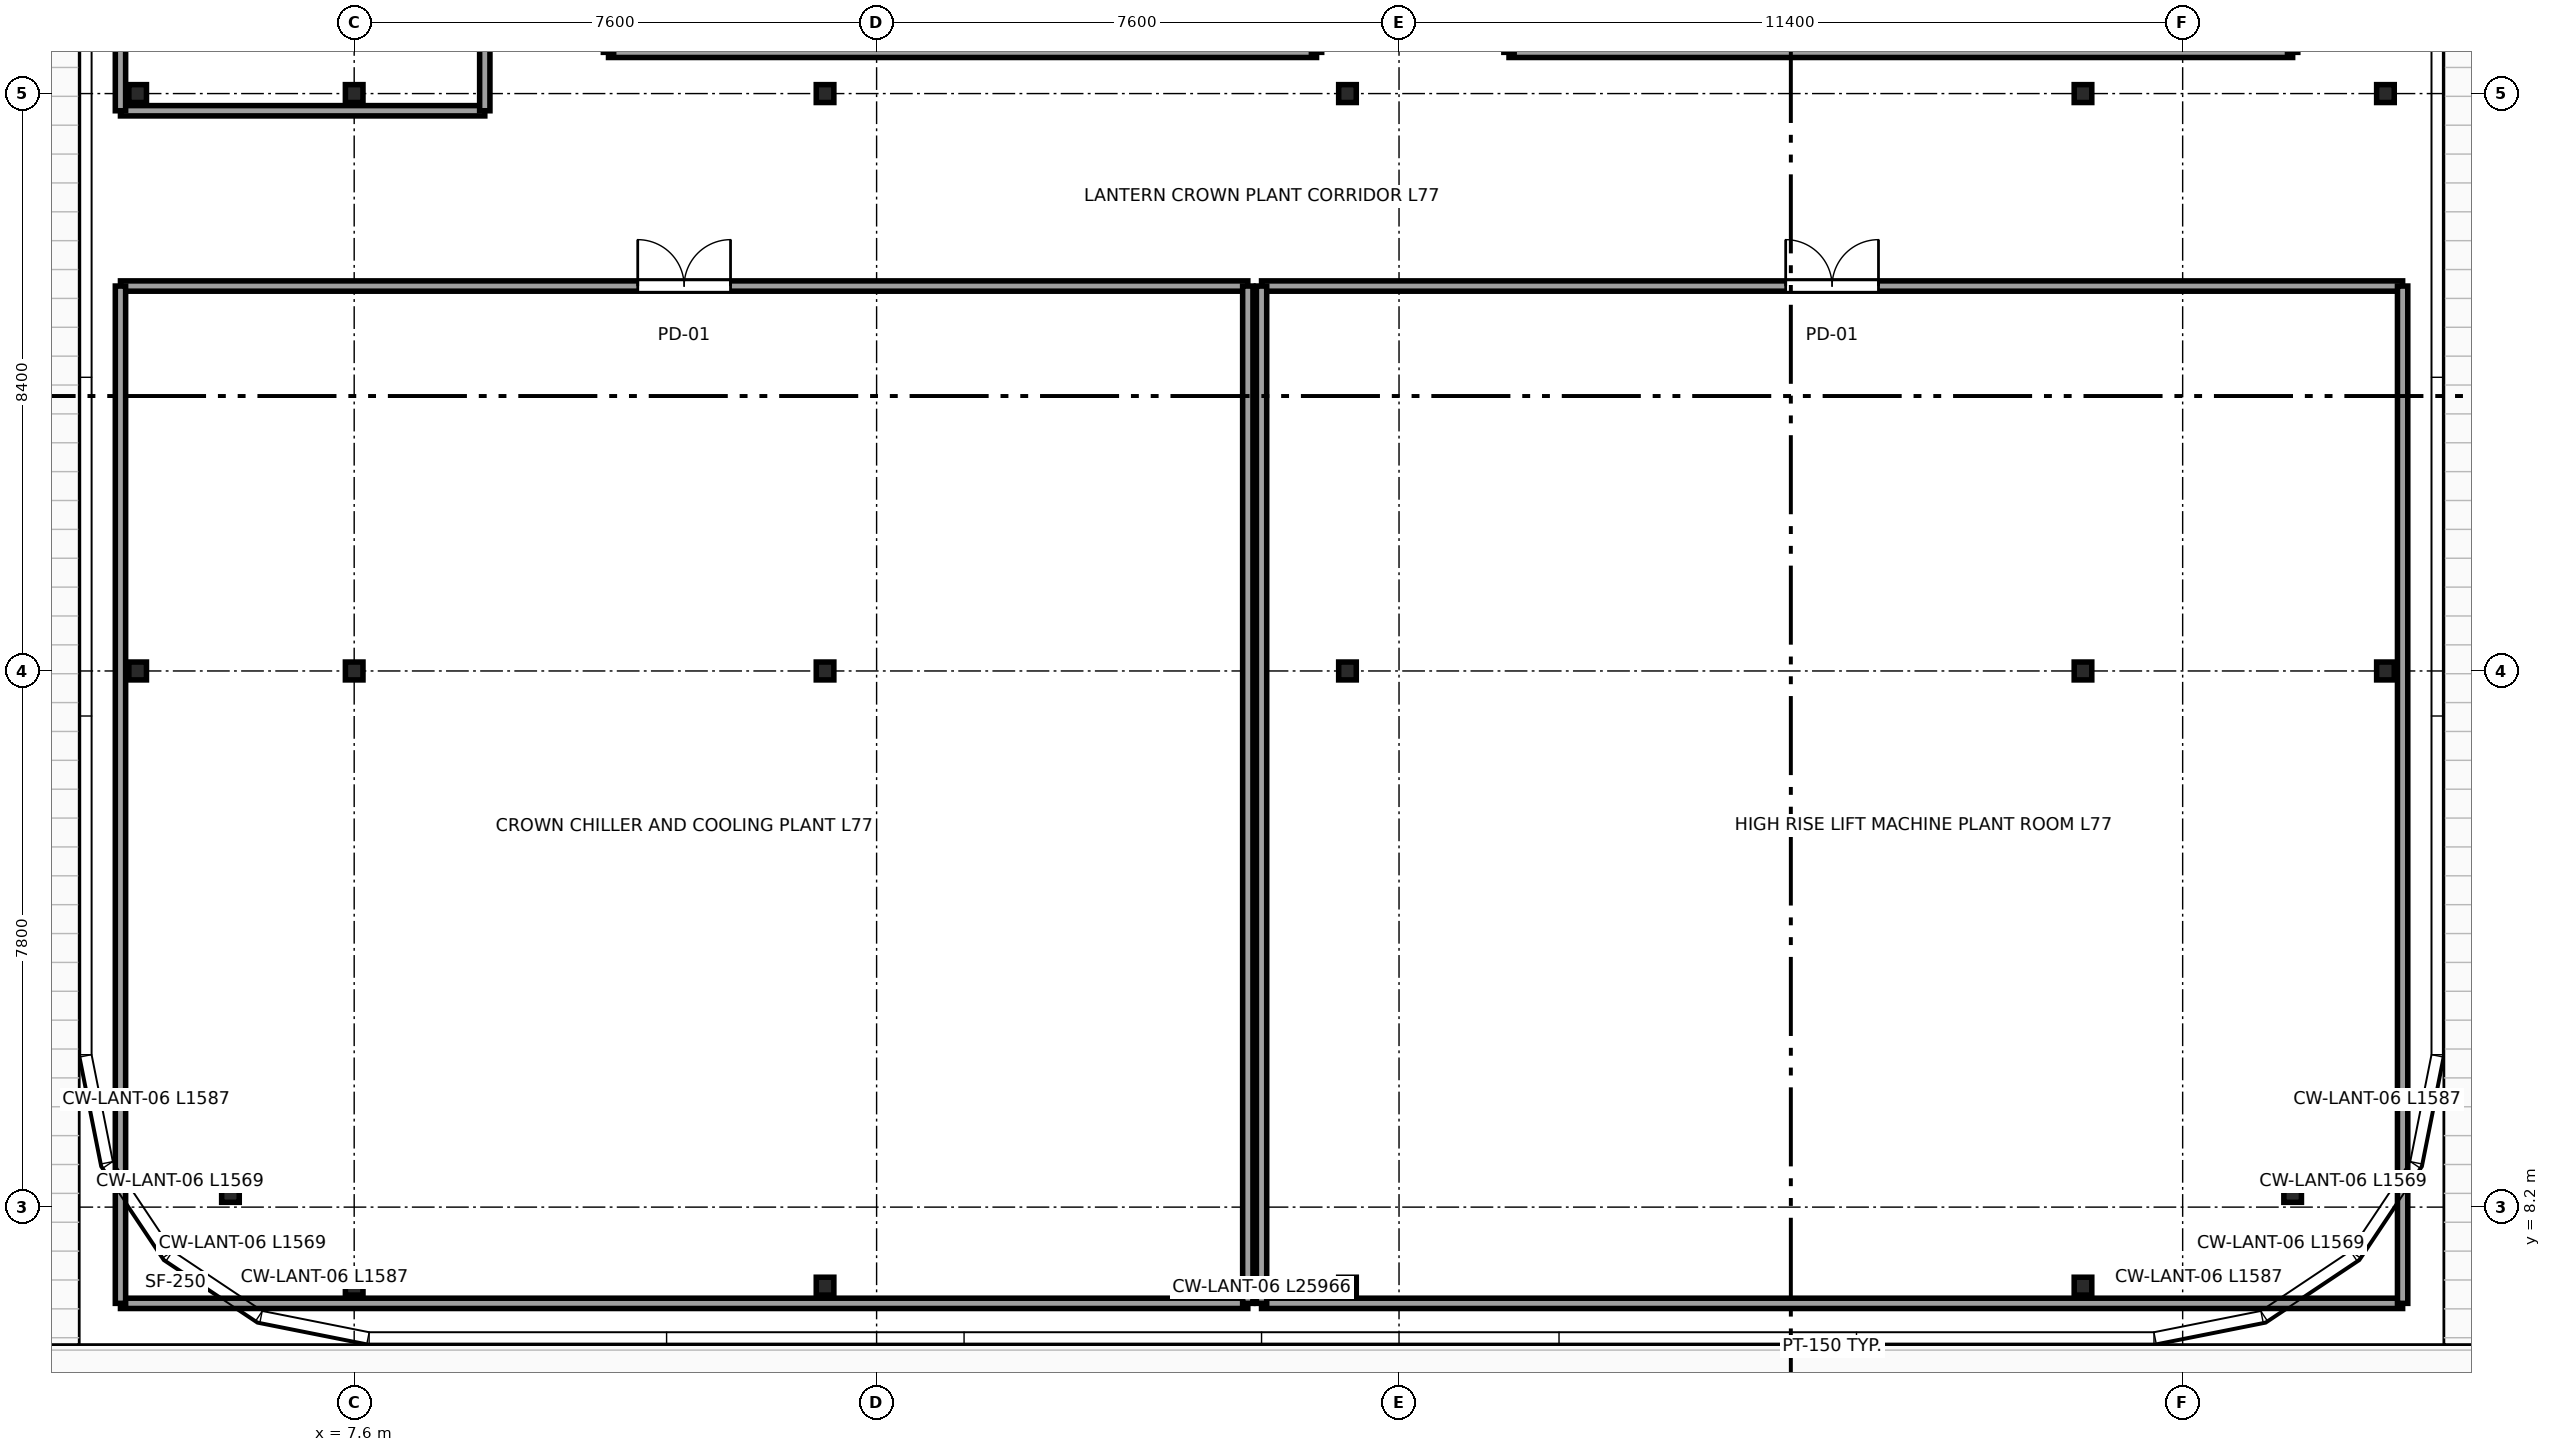
"""IFC4 building model, lengths in metres.
Left out: names, types, materials, properties, quantities, classifications, styles, units other than length and angle.
Written with IfcOpenShell. Run it as: python <this file> out.ifc"""

import sys

from ifc_helpers import new_model, si_unit, direction, frame, frame_2d, origin, origin_2d, place, context, subcontext, project, spatial, rectangle, i_section, extrude, source, transform, mapped, element, fill, save


model = new_model("IFC4")
c1 = context("Model", 3, precision=1e-05, world=origin(), true_north=direction((0.0, 1.0)))
c2 = subcontext(c1, "Body", "Model", "MODEL_VIEW")
j1 = project(units=[si_unit("LENGTHUNIT", "METRE"), si_unit("PLANEANGLEUNIT", "RADIAN")], contexts=[c1])
p1 = place(None, origin())
s1 = spatial("IfcSite", under=j1, at=p1, CompositionType="ELEMENT")
p2 = place(p1, origin())
s2 = spatial("IfcBuilding", under=s1, at=p2, CompositionType="ELEMENT")
p3 = place(p2, frame((0.0, 0.0, 290.95)))
s3 = spatial("IfcBuildingStorey", under=s2, at=p3, CompositionType="ELEMENT", Elevation=290.95)
m1 = source(origin(), c2, "Body", "SweptSolid", [
    extrude(i_section(OverallWidth=0.256, OverallDepth=0.26, WebThickness=0.01, FlangeThickness=0.017, FilletRadius=0.014, at=origin_2d()), origin(), (0.0, 0.0, 1.0), 3.8),
])
for number, where, z_axis, x_axis in (
    (1, (5.8, 8.4, 0.0), (0.0, 0.0, 1.0), (1.0, 0.0, 0.0)),
    (2, (4.45, 16.0, 0.0), (0.0, 0.0, 1.0), (1.0, 0.0, 0.0)),
    (3, (4.45, 24.4, 0.0), (0.0, 0.0, 1.0), (1.0, 0.0, 0.0)),
    (4, (7.6, 7.05, 0.0), (0.0, 0.0, 1.0), (1.0, 0.0, 0.0)),
    (5, (7.6, 16.0, 0.0), (0.0, 0.0, 1.0), (1.0, 0.0, 0.0)),
    (6, (7.6, 24.4, 0.0), (0.0, 0.0, 1.0), (1.0, 0.0, 0.0)),
    (7, (14.45, 7.05, 0.0), (0.0, 0.0, 1.0), (1.0, 0.0, 0.0)),
    (8, (14.45, 16.0, 0.0), (0.0, 0.0, 1.0), (1.0, 0.0, 0.0)),
    (9, (14.45, 24.4, 0.0), (0.0, 0.0, 1.0), (1.0, 0.0, 0.0)),
    (10, (22.05, 7.05, 0.0), (0.0, 0.0, 1.0), (1.0, 0.0, 0.0)),
    (11, (22.05, 16.0, 0.0), (0.0, 0.0, 1.0), (1.0, 0.0, 0.0)),
    (12, (22.05, 24.4, 0.0), (0.0, 0.0, 1.0), (1.0, 0.0, 0.0)),
    (13, (32.75, 7.05, 0.0), (0.0, 0.0, 1.0), (1.0, 0.0, 0.0)),
    (14, (32.75, 16.0, 0.0), (0.0, 0.0, 1.0), (1.0, 0.0, 0.0)),
    (15, (32.75, 24.4, 0.0), (0.0, 0.0, 1.0), (1.0, 0.0, 0.0)),
    (16, (35.8, 8.4, 0.0), (0.0, 0.0, 1.0), (1.0, 0.0, 0.0)),
    (17, (37.15, 16.0, 0.0), (0.0, 0.0, 1.0), (1.0, 0.0, 0.0)),
    (18, (37.15, 24.4, 0.0), (0.0, 0.0, 1.0), (1.0, 0.0, 0.0)),
):
    element("IfcColumn", number, at=place(p3, frame(where, z_axis=z_axis, x_axis=x_axis)), inside=s3, PredefinedType="COLUMN", context=c2, shape_type="MappedRepresentation", body=[
        mapped(m1, transform((0.0, 0.0, 0.0), x_axis=(1.0, 0.0, 0.0), y_axis=(0.0, 1.0, 0.0), z_axis=(0.0, 0.0, 1.0), scale=1.0)),
    ])
p4 = place(p3, frame((4.2, 6.8, 0.0), z_axis=(0.0, 0.0, 1.0), x_axis=(1.0, 0.0, 0.0)))
e19 = element("IfcWall", 19, at=p4, inside=s3, PredefinedType="PARTITIONING", context=c2, shape_type="SweptSolid", body=[
    extrude(rectangle(XDim=16.4, YDim=0.15, at=frame_2d((8.2, 0.0))), origin(), (0.0, 0.0, 1.0), 2.37),
])
p5 = place(p3, frame((4.2, 21.6, 0.0), z_axis=(0.0, 0.0, 1.0), x_axis=(1.0, 0.0, 0.0)))
e20 = element("IfcWall", 20, at=p5, inside=s3, PredefinedType="PARTITIONING", context=c2, shape_type="SweptSolid", body=[
    extrude(rectangle(XDim=16.4, YDim=0.15, at=frame_2d((8.2, 0.0))), origin(), (0.0, 0.0, 1.0), 3.58),
])
p6 = place(p5, frame((7.525, 0.0, 0.0)))
e21 = element("IfcOpeningElement", 21, at=p6, cuts=e20, PredefinedType="OPENING", context=c2, shape_type="SweptSolid", body=[
    extrude(rectangle(XDim=1.35, YDim=2.15, at=frame_2d((0.675, 1.075))), frame((0.0, 0.085, 0.0), z_axis=(0.0, -1.0, 0.0), x_axis=(1.0, 0.0, 0.0)), (0.0, 0.0, 1.0), 0.17),
])
p7 = place(p3, frame((4.2, 6.8, 0.0), z_axis=(0.0, 0.0, 1.0), x_axis=(0.0, 1.0, 0.0)))
e22 = element("IfcWall", 22, at=p7, inside=s3, PredefinedType="PARTITIONING", context=c2, shape_type="SweptSolid", body=[
    extrude(rectangle(XDim=14.8, YDim=0.15, at=frame_2d((7.4, 0.0))), origin(), (0.0, 0.0, 1.0), 2.37),
])
p8 = place(p3, frame((20.6, 6.8, 0.0), z_axis=(0.0, 0.0, 1.0), x_axis=(0.0, 1.0, 0.0)))
e23 = element("IfcWall", 23, at=p8, inside=s3, PredefinedType="PARTITIONING", context=c2, shape_type="SweptSolid", body=[
    extrude(rectangle(XDim=14.8, YDim=0.15, at=frame_2d((7.4, 0.0))), origin(), (0.0, 0.0, 1.0), 3.58),
])
p9 = place(p3, frame((20.8, 6.8, 0.0), z_axis=(0.0, 0.0, 1.0), x_axis=(1.0, 0.0, 0.0)))
e24 = element("IfcWall", 24, at=p9, inside=s3, PredefinedType="PARTITIONING", context=c2, shape_type="SweptSolid", body=[
    extrude(rectangle(XDim=16.6, YDim=0.15, at=frame_2d((8.3, 0.0))), origin(), (0.0, 0.0, 1.0), 2.37),
])
p10 = place(p3, frame((20.8, 21.6, 0.0), z_axis=(0.0, 0.0, 1.0), x_axis=(1.0, 0.0, 0.0)))
e25 = element("IfcWall", 25, at=p10, inside=s3, PredefinedType="PARTITIONING", context=c2, shape_type="SweptSolid", body=[
    extrude(rectangle(XDim=16.6, YDim=0.15, at=frame_2d((8.3, 0.0))), origin(), (0.0, 0.0, 1.0), 3.58),
])
p11 = place(p10, frame((7.625, 0.0, 0.0)))
e26 = element("IfcOpeningElement", 26, at=p11, cuts=e25, PredefinedType="OPENING", context=c2, shape_type="SweptSolid", body=[
    extrude(rectangle(XDim=1.35, YDim=2.15, at=frame_2d((0.675, 1.075))), frame((0.0, 0.085, 0.0), z_axis=(0.0, -1.0, 0.0), x_axis=(1.0, 0.0, 0.0)), (0.0, 0.0, 1.0), 0.17),
])
p12 = place(p3, frame((20.8, 6.8, 0.0), z_axis=(0.0, 0.0, 1.0), x_axis=(0.0, 1.0, 0.0)))
e27 = element("IfcWall", 27, at=p12, inside=s3, PredefinedType="PARTITIONING", context=c2, shape_type="SweptSolid", body=[
    extrude(rectangle(XDim=14.8, YDim=0.15, at=frame_2d((7.4, 0.0))), origin(), (0.0, 0.0, 1.0), 3.58),
])
p13 = place(p3, frame((37.4, 6.8, 0.0), z_axis=(0.0, 0.0, 1.0), x_axis=(0.0, 1.0, 0.0)))
e28 = element("IfcWall", 28, at=p13, inside=s3, PredefinedType="PARTITIONING", context=c2, shape_type="SweptSolid", body=[
    extrude(rectangle(XDim=14.8, YDim=0.15, at=frame_2d((7.4, 0.0))), origin(), (0.0, 0.0, 1.0), 2.37),
])
p14 = place(p3, frame((4.2, 24.15, 0.0), z_axis=(0.0, 0.0, 1.0), x_axis=(1.0, 0.0, 0.0)))
e29 = element("IfcWall", 29, at=p14, inside=s3, PredefinedType="PARTITIONING", context=c2, shape_type="SweptSolid", body=[
    extrude(rectangle(XDim=5.3, YDim=0.15, at=frame_2d((2.65, 0.0))), origin(), (0.0, 0.0, 1.0), 2.37),
])
p15 = place(p3, frame((4.2, 24.15, 0.0), z_axis=(0.0, 0.0, 1.0), x_axis=(0.0, 1.0, 0.0)))
e30 = element("IfcWall", 30, at=p15, inside=s3, PredefinedType="PARTITIONING", context=c2, shape_type="SweptSolid", body=[
    extrude(rectangle(XDim=5.65, YDim=0.15, at=frame_2d((2.825, 0.0))), origin(), (0.0, 0.0, 1.0), 2.37),
])
p16 = place(p3, frame((9.5, 24.15, 0.0), z_axis=(0.0, 0.0, 1.0), x_axis=(0.0, 1.0, 0.0)))
e31 = element("IfcWall", 31, at=p16, inside=s3, PredefinedType="PARTITIONING", context=c2, shape_type="SweptSolid", body=[
    extrude(rectangle(XDim=5.65, YDim=0.15, at=frame_2d((2.825, 0.0))), origin(), (0.0, 0.0, 1.0), 3.58),
])
p17 = place(p3, frame((11.3, 25.0, 0.0), z_axis=(0.0, 0.0, 1.0), x_axis=(1.0, 0.0, 0.0)))
e32 = element("IfcWall", 32, at=p17, inside=s3, PredefinedType="PARTITIONING", context=c2, shape_type="SweptSolid", body=[
    extrude(rectangle(XDim=10.3, YDim=0.15, at=frame_2d((5.15, 0.0))), origin(), (0.0, 0.0, 1.0), 3.58),
])
p18 = place(p3, frame((24.4, 25.0, 0.0), z_axis=(0.0, 0.0, 1.0), x_axis=(1.0, 0.0, 0.0)))
e33 = element("IfcWall", 33, at=p18, inside=s3, PredefinedType="PARTITIONING", context=c2, shape_type="SweptSolid", body=[
    extrude(rectangle(XDim=11.4, YDim=0.15, at=frame_2d((5.7, 0.0))), origin(), (0.0, 0.0, 1.0), 3.58),
])
m2 = source(origin(), c2, "Body", "SweptSolid", [
    extrude(rectangle(XDim=1.35, YDim=2.15, at=frame_2d((0.675, 1.075))), frame((0.0, 0.025, 0.0), z_axis=(0.0, -1.0, 0.0), x_axis=(1.0, 0.0, 0.0)), (0.0, 0.0, 1.0), 0.05),
])
p19 = place(p6, origin())
e34 = element("IfcDoor", 34, at=p19, inside=s3, OperationType="DOUBLE_DOOR_SINGLE_SWING", PredefinedType="DOOR", context=c2, shape_type="MappedRepresentation", body=[
    mapped(m2, transform((0.0, 0.0, 0.0), x_axis=(1.0, 0.0, 0.0), y_axis=(0.0, 1.0, 0.0), z_axis=(0.0, 0.0, 1.0), scale=1.0)),
])
fill(e21, e34)
p20 = place(p11, origin())
e35 = element("IfcDoor", 35, at=p20, inside=s3, OperationType="DOUBLE_DOOR_SINGLE_SWING", PredefinedType="DOOR", context=c2, shape_type="MappedRepresentation", body=[
    mapped(m2, transform((0.0, 0.0, 0.0), x_axis=(1.0, 0.0, 0.0), y_axis=(0.0, 1.0, 0.0), z_axis=(0.0, 0.0, 1.0), scale=1.0)),
])
fill(e26, e35)
save(model, sys.argv[1])
